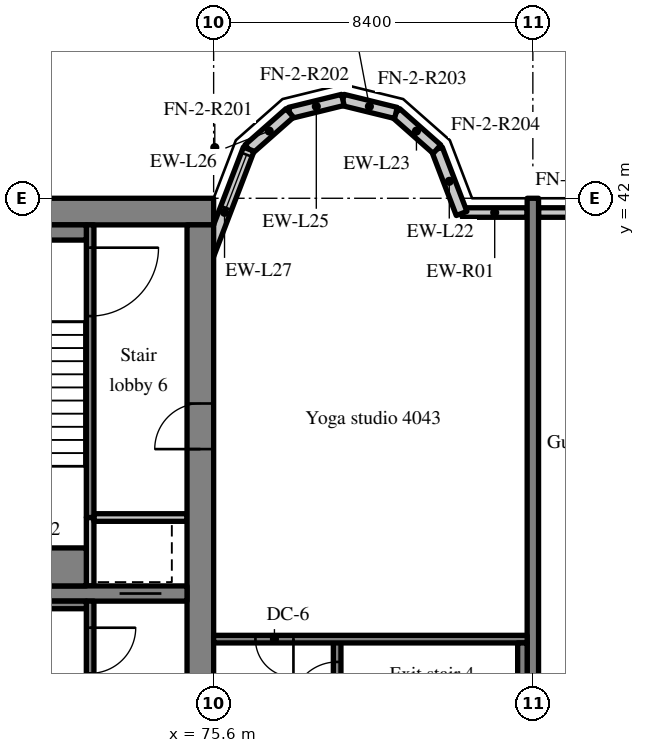
"""IFC4 building model, lengths in metres.
Left out: names, types, materials, properties, quantities, classifications, styles, units other than length and angle.
Written with IfcOpenShell. Run it as: python <this file> out.ifc"""

import sys

from ifc_helpers import new_model, si_unit, direction, frame, frame_2d, origin, place, context, subcontext, project, spatial, rectangle, extrude, source, transform, mapped, element, fill, save


model = new_model("IFC4")
c1 = context("Model", 3, precision=1e-05, world=origin(), true_north=direction((0.0, 1.0)))
c2 = subcontext(c1, "Body", "Model", "MODEL_VIEW")
j1 = project(units=[si_unit("LENGTHUNIT", "METRE"), si_unit("PLANEANGLEUNIT", "RADIAN")], contexts=[c1])
p1 = place(None, origin())
s1 = spatial("IfcSite", under=j1, at=p1, CompositionType="ELEMENT")
p2 = place(p1, origin())
s2 = spatial("IfcBuilding", under=s1, at=p2, CompositionType="ELEMENT")
p3 = place(p2, frame((0.0, 0.0, 166.8)))
s3 = spatial("IfcBuildingStorey", under=s2, at=p3, CompositionType="ELEMENT", Elevation=166.8)
m1 = source(origin(), c2, "Body", "SweptSolid", [
    extrude(rectangle(XDim=50.4, YDim=0.7, at=frame_2d((25.2, 0.0))), origin(), (0.0, 0.0, 1.0), 3.52),
])
p4 = place(p3, frame((25.2, 41.65, 0.0), z_axis=(0.0, 0.0, 1.0), x_axis=(1.0, 0.0, 0.0)))
e1 = element("IfcWall", 1, at=p4, inside=s3, PredefinedType="SHEAR", context=c2, shape_type="MappedRepresentation", body=[
    mapped(m1, transform((0.0, 0.0, 0.0), scale=1.0)),
])
m2 = source(origin(), c2, "Body", "SweptSolid", [
    extrude(rectangle(XDim=18.6, YDim=0.7, at=frame_2d((9.3, 0.0))), origin(), (0.0, 0.0, 1.0), 3.52),
])
p5 = place(p3, frame((75.25, 22.7, 0.0), z_axis=(0.0, 0.0, 1.0), x_axis=(0.0, 1.0, 0.0)))
e2 = element("IfcWall", 2, at=p5, inside=s3, PredefinedType="SHEAR", context=c2, shape_type="MappedRepresentation", body=[
    mapped(m2, transform((0.0, 0.0, 0.0), scale=1.0)),
])
m3 = source(origin(), c2, "Body", "SweptSolid", [
    extrude(rectangle(XDim=1.2, YDim=2.1, at=frame_2d((0.6, 1.05))), frame((0.0, 0.36, 0.0), z_axis=(0.0, -1.0, 0.0), x_axis=(1.0, 0.0, 0.0)), (0.0, 0.0, 1.0), 0.72),
])
p6 = place(p5, frame((12.7, 0.0, 0.0)))
e3 = element("IfcOpeningElement", 3, at=p6, cuts=e2, PredefinedType="OPENING", context=c2, shape_type="MappedRepresentation", body=[
    mapped(m3, transform((0.0, 0.0, 0.0), scale=1.0)),
])
m4 = source(origin(), c2, "Body", "SweptSolid", [
    extrude(rectangle(XDim=7.5, YDim=0.4, at=frame_2d((3.75, 0.0))), origin(), (0.0, 0.0, 1.0), 3.52),
])
p7 = place(p3, frame((67.4, 31.6, 0.0), z_axis=(0.0, 0.0, 1.0), x_axis=(1.0, 0.0, 0.0)))
e4 = element("IfcWall", 4, at=p7, inside=s3, PredefinedType="SHEAR", context=c2, shape_type="MappedRepresentation", body=[
    mapped(m4, transform((0.0, 0.0, 0.0), scale=1.0)),
])
m5 = source(origin(), c2, "Body", "SweptSolid", [
    extrude(rectangle(XDim=1.1, YDim=2.1, at=frame_2d((0.55, 1.05))), frame((0.0, 0.21, 0.0), z_axis=(0.0, -1.0, 0.0), x_axis=(1.0, 0.0, 0.0)), (0.0, 0.0, 1.0), 0.42),
])
p8 = place(p7, frame((5.725, 0.0, 0.0)))
e5 = element("IfcOpeningElement", 5, at=p8, cuts=e4, PredefinedType="OPENING", context=c2, shape_type="MappedRepresentation", body=[
    mapped(m5, transform((0.0, 0.0, 0.0), scale=1.0)),
])
m6 = source(origin(), c2, "Body", "SweptSolid", [
    extrude(rectangle(XDim=20.0, YDim=0.3, at=frame_2d((10.0, 0.0))), origin(), (0.0, 0.0, 1.0), 3.52),
])
p9 = place(p3, frame((84.0, 22.0, 0.0), z_axis=(0.0, 0.0, 1.0), x_axis=(0.0, 1.0, 0.0)))
e6 = element("IfcWall", 6, at=p9, inside=s3, PredefinedType="SHEAR", context=c2, shape_type="MappedRepresentation", body=[
    mapped(m6, transform((0.0, 0.0, 0.0), scale=1.0)),
])
m7 = source(origin(), c2, "Body", "SweptSolid", [
    extrude(rectangle(XDim=1.708, YDim=0.25, at=frame_2d((0.854, 0.0))), origin(), (0.0, 0.0, 1.0), 2.87),
])
p10 = place(p3, frame((83.85, 41.625, 0.0), z_axis=(0.0, 0.0, 1.0), x_axis=(-1.0, 0.0, 0.0)))
e7 = element("IfcWall", 7, at=p10, inside=s3, PredefinedType="SOLIDWALL", context=c2, shape_type="MappedRepresentation", body=[
    mapped(m7, transform((0.0, 0.0, 0.0), scale=1.0)),
])
m8 = source(origin(), c2, "Body", "SweptSolid", [
    extrude(rectangle(XDim=4.095, YDim=0.25, at=frame_2d((2.047, 0.0))), origin(), (0.0, 0.0, 1.0), 2.87),
])
p11 = place(p3, frame((88.245, 41.625, 0.0), z_axis=(0.0, 0.0, 1.0), x_axis=(-1.0, 0.0, 0.0)))
e8 = element("IfcWall", 8, at=p11, inside=s3, PredefinedType="SOLIDWALL", context=c2, shape_type="MappedRepresentation", body=[
    mapped(m8, transform((0.0, 0.0, 0.0), scale=1.0)),
])
m9 = source(origin(), c2, "Body", "SweptSolid", [
    extrude(rectangle(XDim=1.5, YDim=1.5, at=frame_2d((0.75, 0.75))), frame((0.0, 0.135, 0.0), z_axis=(0.0, -1.0, 0.0), x_axis=(1.0, 0.0, 0.0)), (0.0, 0.0, 1.0), 0.27),
])
p12 = place(p11, frame((1.297, 0.0, 0.9)))
e9 = element("IfcOpeningElement", 9, at=p12, cuts=e8, PredefinedType="OPENING", context=c2, shape_type="MappedRepresentation", body=[
    mapped(m9, transform((0.0, 0.0, 0.0), scale=1.0)),
])
m10 = source(origin(), c2, "Body", "SweptSolid", [
    extrude(rectangle(XDim=1.812, YDim=0.3, at=frame_2d((0.906, 0.0))), origin(), (0.0, 0.0, 1.0), 3.52),
])
p13 = place(p3, frame((82.125, 41.6, 0.0), z_axis=(0.0, 0.0, 1.0), x_axis=(-0.357877270961, 0.93376863244, 0.0)))
e10 = element("IfcWall", 10, at=p13, inside=s3, PredefinedType="SOLIDWALL", context=c2, shape_type="MappedRepresentation", body=[
    mapped(m10, transform((0.0, 0.0, 0.0), scale=1.0)),
])
m11 = source(origin(), c2, "Body", "SweptSolid", [
    extrude(rectangle(XDim=1.44, YDim=0.3, at=frame_2d((0.72, 0.0))), origin(), (0.0, 0.0, 1.0), 3.52),
])
p14 = place(p3, frame((81.477, 43.292, 0.0), z_axis=(0.0, 0.0, 1.0), x_axis=(-0.74957555648, 0.661918790432, 0.0)))
e11 = element("IfcWall", 11, at=p14, inside=s3, PredefinedType="SOLIDWALL", context=c2, shape_type="MappedRepresentation", body=[
    mapped(m11, transform((0.0, 0.0, 0.0), scale=1.0)),
])
m12 = source(origin(), c2, "Body", "SweptSolid", [
    extrude(rectangle(XDim=1.439, YDim=0.3, at=frame_2d((0.719, 0.0))), origin(), (0.0, 0.0, 1.0), 3.52),
])
for number, where, z_axis, x_axis in (
    (12, (80.397, 44.245, 0.0), (0.0, 0.0, 1.0), (-0.971, 0.238, 0.0)),
    (13, (79.0, 44.588, 0.0), (0.0, 0.0, 1.0), (-0.971, -0.238, 0.0)),
):
    element("IfcWall", number, at=place(p3, frame(where, z_axis=z_axis, x_axis=x_axis)), inside=s3, PredefinedType="SOLIDWALL", context=c2, shape_type="MappedRepresentation", body=[
        mapped(m12, transform((0.0, 0.0, 0.0), scale=1.0)),
    ])
p15 = place(p3, frame((77.603, 44.245, 0.0), z_axis=(0.0, 0.0, 1.0), x_axis=(-0.74957555648, -0.661918790432, 0.0)))
e14 = element("IfcWall", 14, at=p15, inside=s3, PredefinedType="SOLIDWALL", context=c2, shape_type="MappedRepresentation", body=[
    mapped(m11, transform((0.0, 0.0, 0.0), scale=1.0)),
])
m13 = source(origin(), c2, "Body", "SweptSolid", [
    extrude(rectangle(XDim=3.559, YDim=0.3, at=frame_2d((1.78, 0.0))), origin(), (0.0, 0.0, 1.0), 3.52),
])
p16 = place(p3, frame((76.523, 43.292, 0.0), z_axis=(0.0, 0.0, 1.0), x_axis=(-0.35779745313, -0.933799219604, 0.0)))
e15 = element("IfcWall", 15, at=p16, inside=s3, PredefinedType="SOLIDWALL", context=c2, shape_type="MappedRepresentation", body=[
    mapped(m13, transform((0.0, 0.0, 0.0), scale=1.0)),
])
m14 = source(origin(), c2, "Body", "SweptSolid", [
    extrude(rectangle(XDim=1.5, YDim=2.0, at=frame_2d((0.75, 1.0))), frame((0.0, 0.16, 0.0), z_axis=(0.0, -1.0, 0.0), x_axis=(1.0, 0.0, 0.0)), (0.0, 0.0, 1.0), 0.32),
])
p17 = place(p16, frame((0.156, 0.0, 0.9)))
e16 = element("IfcOpeningElement", 16, at=p17, cuts=e15, PredefinedType="OPENING", context=c2, shape_type="MappedRepresentation", body=[
    mapped(m14, transform((0.0, 0.0, 0.0), scale=1.0)),
])
m15 = source(origin(), c2, "Body", "SweptSolid", [
    extrude(rectangle(XDim=8.7, YDim=0.2, at=frame_2d((4.35, 0.0))), origin(), (0.0, 0.0, 1.0), 3.52),
])
p18 = place(p3, frame((72.35, 22.7, 0.0), z_axis=(0.0, 0.0, 1.0), x_axis=(0.0, 1.0, 0.0)))
e17 = element("IfcWall", 17, at=p18, inside=s3, PredefinedType="SOLIDWALL", context=c2, shape_type="MappedRepresentation", body=[
    mapped(m15, transform((0.0, 0.0, 0.0), scale=1.0)),
])
m16 = source(origin(), c2, "Body", "SweptSolid", [
    extrude(rectangle(XDim=1.2, YDim=2.1, at=frame_2d((0.6, 1.05))), frame((0.0, 0.11, 0.0), z_axis=(0.0, -1.0, 0.0), x_axis=(1.0, 0.0, 0.0)), (0.0, 0.0, 1.0), 0.22),
])
p19 = place(p18, frame((6.8, 0.0, 0.0)))
e18 = element("IfcOpeningElement", 18, at=p19, cuts=e17, PredefinedType="OPENING", context=c2, shape_type="MappedRepresentation", body=[
    mapped(m16, transform((0.0, 0.0, 0.0), scale=1.0)),
])
m17 = source(origin(), c2, "Body", "SweptSolid", [
    extrude(rectangle(XDim=1.8, YDim=0.2, at=frame_2d((0.9, 0.0))), origin(), (0.0, 0.0, 1.0), 3.52),
])
p20 = place(p3, frame((72.35, 31.8, 0.0), z_axis=(0.0, 0.0, 1.0), x_axis=(0.0, 1.0, 0.0)))
e19 = element("IfcWall", 19, at=p20, inside=s3, PredefinedType="SOLIDWALL", context=c2, shape_type="MappedRepresentation", body=[
    mapped(m17, transform((0.0, 0.0, 0.0), scale=1.0)),
])
m18 = source(origin(), c2, "Body", "SweptSolid", [
    extrude(rectangle(XDim=2.45, YDim=0.2, at=frame_2d((1.225, 0.0))), origin(), (0.0, 0.0, 1.0), 3.52),
])
p21 = place(p3, frame((72.45, 33.6, 0.0), z_axis=(0.0, 0.0, 1.0), x_axis=(1.0, 0.0, 0.0)))
e20 = element("IfcWall", 20, at=p21, inside=s3, PredefinedType="SOLIDWALL", context=c2, shape_type="MappedRepresentation", body=[
    mapped(m18, transform((0.0, 0.0, 0.0), scale=1.0)),
])
m19 = source(origin(), c2, "Body", "SweptSolid", [
    extrude(rectangle(XDim=7.7, YDim=0.2, at=frame_2d((3.85, 0.0))), origin(), (0.0, 0.0, 1.0), 3.52),
])
p22 = place(p3, frame((72.35, 33.6, 0.0), z_axis=(0.0, 0.0, 1.0), x_axis=(0.0, 1.0, 0.0)))
e21 = element("IfcWall", 21, at=p22, inside=s3, PredefinedType="SOLIDWALL", context=c2, shape_type="MappedRepresentation", body=[
    mapped(m19, transform((0.0, 0.0, 0.0), scale=1.0)),
])
m20 = source(origin(), c2, "Body", "SweptSolid", [
    extrude(rectangle(XDim=1.8, YDim=2.1, at=frame_2d((0.9, 1.05))), frame((0.0, 0.11, 0.0), z_axis=(0.0, -1.0, 0.0), x_axis=(1.0, 0.0, 0.0)), (0.0, 0.0, 1.0), 0.22),
])
p23 = place(p22, frame((5.3, 0.0, 0.0)))
e22 = element("IfcOpeningElement", 22, at=p23, cuts=e21, PredefinedType="OPENING", context=c2, shape_type="MappedRepresentation", body=[
    mapped(m20, transform((0.0, 0.0, 0.0), scale=1.0)),
])
m21 = source(origin(), c2, "Body", "SweptSolid", [
    extrude(rectangle(XDim=8.3, YDim=0.2, at=frame_2d((4.15, 0.0))), origin(), (0.0, 0.0, 1.0), 3.52),
])
p24 = place(p3, frame((78.85, 22.1, 0.0), z_axis=(0.0, 0.0, 1.0), x_axis=(0.0, 1.0, 0.0)))
e23 = element("IfcWall", 23, at=p24, inside=s3, PredefinedType="SOLIDWALL", context=c2, shape_type="MappedRepresentation", body=[
    mapped(m21, transform((0.0, 0.0, 0.0), scale=1.0)),
])
p25 = place(p24, frame((6.5, 0.0, 0.0)))
e24 = element("IfcOpeningElement", 24, at=p25, cuts=e23, PredefinedType="OPENING", context=c2, shape_type="MappedRepresentation", body=[
    mapped(m16, transform((0.0, 0.0, 0.0), scale=1.0)),
])
m22 = source(origin(), c2, "Body", "SweptSolid", [
    extrude(rectangle(XDim=8.25, YDim=0.2, at=frame_2d((4.125, 0.0))), origin(), (0.0, 0.0, 1.0), 3.52),
])
p26 = place(p3, frame((83.85, 30.4, 0.0), z_axis=(0.0, 0.0, 1.0), x_axis=(-1.0, 0.0, 0.0)))
e25 = element("IfcWall", 25, at=p26, inside=s3, PredefinedType="SOLIDWALL", context=c2, shape_type="MappedRepresentation", body=[
    mapped(m22, transform((0.0, 0.0, 0.0), scale=1.0)),
])
m23 = source(origin(), c2, "Body", "SweptSolid", [
    extrude(rectangle(XDim=1.0, YDim=2.1, at=frame_2d((0.5, 1.05))), frame((0.0, 0.11, 0.0), z_axis=(0.0, -1.0, 0.0), x_axis=(1.0, 0.0, 0.0)), (0.0, 0.0, 1.0), 0.22),
])
p27 = place(p26, frame((6.15, 0.0, 0.0)))
e26 = element("IfcOpeningElement", 26, at=p27, cuts=e25, PredefinedType="OPENING", context=c2, shape_type="MappedRepresentation", body=[
    mapped(m23, transform((0.0, 0.0, 0.0), scale=1.0)),
])
m24 = source(origin(), c2, "Body", "SweptSolid", [
    extrude(rectangle(XDim=4.85, YDim=0.2, at=frame_2d((2.425, 0.0))), origin(), (0.0, 0.0, 1.0), 3.52),
])
p28 = place(p3, frame((67.4, 31.3, 0.0), z_axis=(0.0, 0.0, 1.0), x_axis=(1.0, 0.0, 0.0)))
e27 = element("IfcWall", 27, at=p28, inside=s3, PredefinedType="SOLIDWALL", context=c2, shape_type="MappedRepresentation", body=[
    mapped(m24, transform((0.0, 0.0, 0.0), scale=1.0)),
])
m25 = source(origin(), c2, "Body", "SweptSolid", [
    extrude(rectangle(XDim=4.85, YDim=0.4, at=frame_2d((2.425, 0.0))), origin(), (0.0, 0.0, 1.0), 3.52),
])
p29 = place(p3, frame((67.4, 41.1, 0.0), z_axis=(0.0, 0.0, 1.0), x_axis=(1.0, 0.0, 0.0)))
e28 = element("IfcWall", 28, at=p29, inside=s3, PredefinedType="SOLIDWALL", context=c2, shape_type="MappedRepresentation", body=[
    mapped(m25, transform((0.0, 0.0, 0.0), scale=1.0)),
])
m26 = source(origin(), c2, "Body", "SweptSolid", [
    extrude(rectangle(XDim=4.85, YDim=1.0, at=frame_2d((2.425, 0.0))), origin(), (0.0, 0.0, 1.0), 3.52),
])
p30 = place(p3, frame((67.4, 32.3, 0.0), z_axis=(0.0, 0.0, 1.0), x_axis=(1.0, 0.0, 0.0)))
e29 = element("IfcWall", 29, at=p30, inside=s3, PredefinedType="SOLIDWALL", context=c2, shape_type="MappedRepresentation", body=[
    mapped(m26, transform((0.0, 0.0, 0.0), scale=1.0)),
])
m27 = source(origin(), c2, "Body", "SweptSolid", [
    extrude(rectangle(XDim=8.1, YDim=0.25, at=frame_2d((4.05, 0.0))), origin(), (0.0, 0.0, 1.0), 3.52),
])
p31 = place(p3, frame((83.725, 22.2, 0.0), z_axis=(0.0, 0.0, 1.0), x_axis=(0.0, 1.0, 0.0)))
e30 = element("IfcWall", 30, at=p31, inside=s3, PredefinedType="SOLIDWALL", context=c2, shape_type="MappedRepresentation", body=[
    mapped(m27, transform((0.0, 0.0, 0.0), scale=1.0)),
])
m28 = source(origin(), c2, "Body", "SweptSolid", [
    extrude(rectangle(XDim=1.5, YDim=2.0, at=frame_2d((0.75, 1.0))), frame((0.0, 0.03, 0.0), z_axis=(0.0, -1.0, 0.0), x_axis=(1.0, 0.0, 0.0)), (0.0, 0.0, 1.0), 0.06),
])
p32 = place(p17, origin())
e31 = element("IfcWindow", 31, at=p32, inside=s3, PartitioningType="SINGLE_PANEL", PredefinedType="WINDOW", context=c2, shape_type="MappedRepresentation", body=[
    mapped(m28, transform((0.0, 0.0, 0.0), scale=1.0)),
])
fill(e16, e31)
m29 = source(origin(), c2, "Body", "SweptSolid", [
    extrude(rectangle(XDim=1.2, YDim=2.1, at=frame_2d((0.6, 1.05))), frame((0.0, 0.025, 0.0), z_axis=(0.0, -1.0, 0.0), x_axis=(1.0, 0.0, 0.0)), (0.0, 0.0, 1.0), 0.05),
])
p33 = place(p19, origin())
e32 = element("IfcDoor", 32, at=p33, inside=s3, OperationType="SINGLE_SWING_RIGHT", PredefinedType="DOOR", context=c2, shape_type="MappedRepresentation", body=[
    mapped(m29, transform((0.0, 0.0, 0.0), scale=1.0)),
])
fill(e18, e32)
m30 = source(origin(), c2, "Body", "SweptSolid", [
    extrude(rectangle(XDim=1.1, YDim=2.1, at=frame_2d((0.55, 1.05))), frame((0.0, 0.025, 0.0), z_axis=(0.0, -1.0, 0.0), x_axis=(1.0, 0.0, 0.0)), (0.0, 0.0, 1.0), 0.05),
])
p34 = place(p8, origin())
e33 = element("IfcDoor", 33, at=p34, inside=s3, OperationType="SLIDING_TO_LEFT", PredefinedType="DOOR", context=c2, shape_type="MappedRepresentation", body=[
    mapped(m30, transform((0.0, 0.0, 0.0), scale=1.0)),
])
fill(e5, e33)
m31 = source(origin(), c2, "Body", "SweptSolid", [
    extrude(rectangle(XDim=1.8, YDim=2.1, at=frame_2d((0.9, 1.05))), frame((0.0, 0.025, 0.0), z_axis=(0.0, -1.0, 0.0), x_axis=(1.0, 0.0, 0.0)), (0.0, 0.0, 1.0), 0.05),
])
p35 = place(p23, origin())
e34 = element("IfcDoor", 34, at=p35, inside=s3, OperationType="SINGLE_SWING_RIGHT", PredefinedType="DOOR", context=c2, shape_type="MappedRepresentation", body=[
    mapped(m31, transform((0.0, 0.0, 0.0), scale=1.0)),
])
fill(e22, e34)
p36 = place(p6, origin())
e35 = element("IfcDoor", 35, at=p36, inside=s3, OperationType="SINGLE_SWING_LEFT", PredefinedType="DOOR", context=c2, shape_type="MappedRepresentation", body=[
    mapped(m29, transform((0.0, 0.0, 0.0), scale=1.0)),
])
fill(e3, e35)
p37 = place(p25, origin())
e36 = element("IfcDoor", 36, at=p37, inside=s3, OperationType="SINGLE_SWING_LEFT", PredefinedType="DOOR", context=c2, shape_type="MappedRepresentation", body=[
    mapped(m29, transform((0.0, 0.0, 0.0), scale=1.0)),
])
fill(e24, e36)
m32 = source(origin(), c2, "Body", "SweptSolid", [
    extrude(rectangle(XDim=1.0, YDim=2.1, at=frame_2d((0.5, 1.05))), frame((0.0, 0.025, 0.0), z_axis=(0.0, -1.0, 0.0), x_axis=(1.0, 0.0, 0.0)), (0.0, 0.0, 1.0), 0.05),
])
p38 = place(p27, origin())
e37 = element("IfcDoor", 37, at=p38, inside=s3, OperationType="SINGLE_SWING_LEFT", PredefinedType="DOOR", context=c2, shape_type="MappedRepresentation", body=[
    mapped(m32, transform((0.0, 0.0, 0.0), scale=1.0)),
])
fill(e26, e37)
save(model, sys.argv[1])
